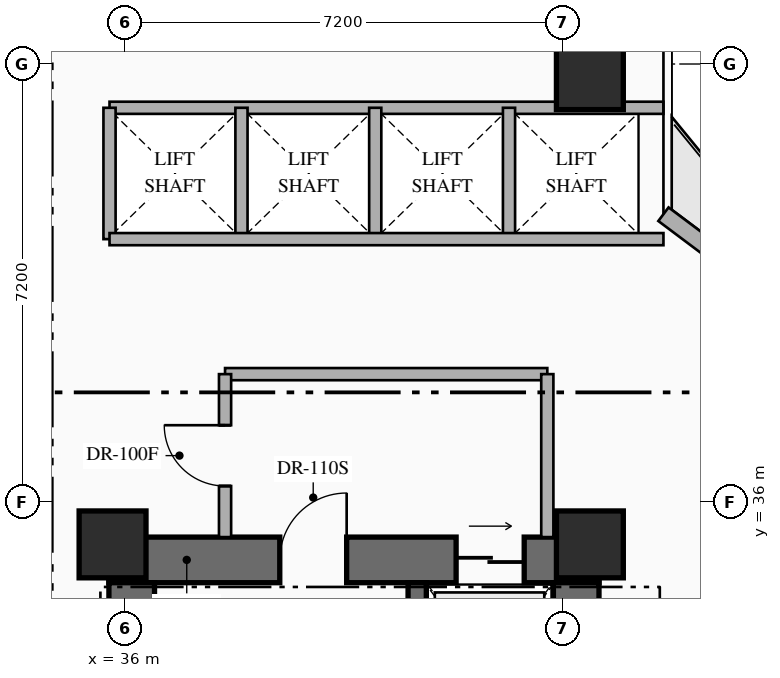
"""IFC4 building model, lengths in metres.
Left out: names, types, materials, properties, quantities, classifications, styles, units other than length and angle.
Written with IfcOpenShell. Run it as: python <this file> out.ifc"""

import sys

from ifc_helpers import new_model, si_unit, direction, frame, frame_2d, origin, origin_2d, place, context, subcontext, project, spatial, rectangle, extrude, element, fill, save


model = new_model("IFC4")
c1 = context("Model", 3, precision=1e-05, world=origin(), true_north=direction((0.0, 1.0)))
c2 = subcontext(c1, "Body", "Model", "MODEL_VIEW")
j1 = project(units=[si_unit("LENGTHUNIT", "METRE"), si_unit("PLANEANGLEUNIT", "RADIAN")], contexts=[c1])
p1 = place(None, origin())
s1 = spatial("IfcSite", under=j1, at=p1, CompositionType="ELEMENT")
p2 = place(p1, origin())
s2 = spatial("IfcBuilding", under=s1, at=p2, CompositionType="ELEMENT")
p3 = place(p2, frame((0.0, 0.0, 74.6)))
s3 = spatial("IfcBuildingStorey", under=s2, at=p3, CompositionType="ELEMENT", Elevation=74.6)
p4 = place(p3, frame((35.74, 35.045, 0.0), z_axis=(0.0, 0.0, 1.0), x_axis=(1.0, 0.0, 0.0)))
e1 = element("IfcWall", 1, at=p4, inside=s3, PredefinedType="SHEAR", context=c2, shape_type="SweptSolid", body=[
    extrude(rectangle(XDim=8.06, YDim=0.75, at=frame_2d((4.03, 0.0))), origin(), (0.0, 0.0, 1.0), 3.35),
])
p5 = place(p4, frame((2.81, 0.0, 0.0)))
e2 = element("IfcOpeningElement", 2, at=p5, cuts=e1, PredefinedType="OPENING", context=c2, shape_type="SweptSolid", body=[
    extrude(rectangle(XDim=1.1, YDim=2.2, at=frame_2d((0.55, 1.1))), frame((0.0, 0.385, 0.0), z_axis=(0.0, -1.0, 0.0), x_axis=(1.0, 0.0, 0.0)), (0.0, 0.0, 1.0), 0.77),
])
p6 = place(p4, frame((5.71, 0.0, 0.0)))
e3 = element("IfcOpeningElement", 3, at=p6, cuts=e1, PredefinedType="OPENING", context=c2, shape_type="SweptSolid", body=[
    extrude(rectangle(XDim=1.12, YDim=2.15, at=frame_2d((0.56, 1.075))), frame((0.0, 0.385, 0.0), z_axis=(0.0, -1.0, 0.0), x_axis=(1.0, 0.0, 0.0)), (0.0, 0.0, 1.0), 0.77),
])
p7 = place(p3, frame((36.115, 25.19, 0.0), z_axis=(0.0, 0.0, 1.0), x_axis=(0.0, 1.0, 0.0)))
e4 = element("IfcWall", 4, at=p7, inside=s3, PredefinedType="SHEAR", context=c2, shape_type="SweptSolid", body=[
    extrude(rectangle(XDim=9.48, YDim=0.75, at=frame_2d((4.74, 0.0))), origin(), (0.0, 0.0, 1.0), 3.35),
])
p8 = place(p3, frame((43.425, 25.19, 0.0), z_axis=(0.0, 0.0, 1.0), x_axis=(0.0, 1.0, 0.0)))
e5 = element("IfcWall", 5, at=p8, inside=s3, PredefinedType="SHEAR", context=c2, shape_type="SweptSolid", body=[
    extrude(rectangle(XDim=9.48, YDim=0.75, at=frame_2d((4.74, 0.0))), origin(), (0.0, 0.0, 1.0), 3.35),
])
p9 = place(p8, frame((1.51, 0.0, 0.0)))
e6 = element("IfcOpeningElement", 6, at=p9, cuts=e5, PredefinedType="OPENING", context=c2, shape_type="SweptSolid", body=[
    extrude(rectangle(XDim=0.85, YDim=2.08, at=frame_2d((0.425, 1.04))), frame((0.0, 0.385, 0.0), z_axis=(0.0, -1.0, 0.0), x_axis=(1.0, 0.0, 0.0)), (0.0, 0.0, 1.0), 0.77),
])
p10 = place(p8, frame((4.76, 0.0, 0.0)))
e7 = element("IfcOpeningElement", 7, at=p10, cuts=e5, PredefinedType="OPENING", context=c2, shape_type="SweptSolid", body=[
    extrude(rectangle(XDim=0.85, YDim=2.08, at=frame_2d((0.425, 1.04))), frame((0.0, 0.385, 0.0), z_axis=(0.0, -1.0, 0.0), x_axis=(1.0, 0.0, 0.0)), (0.0, 0.0, 1.0), 0.77),
])
p11 = place(p3, frame((40.81, 25.19, 0.0), z_axis=(0.0, 0.0, 1.0), x_axis=(0.0, 1.0, 0.0)))
e8 = element("IfcWall", 8, at=p11, inside=s3, PredefinedType="SHEAR", context=c2, shape_type="SweptSolid", body=[
    extrude(rectangle(XDim=9.48, YDim=0.3, at=frame_2d((4.74, 0.0))), origin(), (0.0, 0.0, 1.0), 3.35),
])
for number, where, z_axis, x_axis in (
    (9, (35.8, 35.3, 0.0), (0.0, 0.0, 1.0), (1.0, 0.0, 0.0)),
    (10, (43.65, 35.3, 0.0), (0.0, 0.0, 1.0), (1.0, 0.0, 0.0)),
    (11, (43.65, 43.0, 0.0), (0.0, 0.0, 1.0), (1.0, 0.0, 0.0)),
):
    element("IfcColumn", number, at=place(p3, frame(where, z_axis=z_axis, x_axis=x_axis)), inside=s3, PredefinedType="COLUMN", context=c2, shape_type="SweptSolid", body=[
        extrude(rectangle(XDim=1.1, YDim=1.1, at=origin_2d()), origin(), (0.0, 0.0, 1.0), 3.35),
    ])
p12 = place(p3, frame((44.86, 40.73, 0.0), z_axis=(0.0, 0.0, 1.0), x_axis=(0.800006902154, -0.599990797017, 0.0)))
e12 = element("IfcWall", 12, at=p12, inside=s3, PredefinedType="STANDARD", context=c2, shape_type="SweptSolid", body=[
    extrude(rectangle(XDim=29.712, YDim=0.28, at=frame_2d((14.856, 0.0))), origin(), (0.0, 0.0, 1.0), 3.13),
])
p13 = place(p12, frame((14.249, 0.0, 0.0)))
e13 = element("IfcOpeningElement", 13, at=p13, cuts=e12, PredefinedType="OPENING", context=c2, shape_type="SweptSolid", body=[
    extrude(rectangle(XDim=1.1, YDim=2.2, at=frame_2d((0.55, 1.1))), frame((0.0, 0.15, 0.0), z_axis=(0.0, -1.0, 0.0), x_axis=(1.0, 0.0, 0.0)), (0.0, 0.0, 1.0), 0.3),
])
p14 = place(p12, frame((1.612, 0.0, 0.85)))
e14 = element("IfcOpeningElement", 14, at=p14, cuts=e12, PredefinedType="OPENING", context=c2, shape_type="SweptSolid", body=[
    extrude(rectangle(XDim=1.4, YDim=1.8, at=frame_2d((0.7, 0.9))), frame((0.0, 0.15, 0.0), z_axis=(0.0, -1.0, 0.0), x_axis=(1.0, 0.0, 0.0)), (0.0, 0.0, 1.0), 0.3),
])
p15 = place(p12, frame((5.667, 0.0, 0.85)))
e15 = element("IfcOpeningElement", 15, at=p15, cuts=e12, PredefinedType="OPENING", context=c2, shape_type="SweptSolid", body=[
    extrude(rectangle(XDim=1.4, YDim=1.8, at=frame_2d((0.7, 0.9))), frame((0.0, 0.15, 0.0), z_axis=(0.0, -1.0, 0.0), x_axis=(1.0, 0.0, 0.0)), (0.0, 0.0, 1.0), 0.3),
])
p16 = place(p12, frame((9.912, 0.0, 0.85)))
e16 = element("IfcOpeningElement", 16, at=p16, cuts=e12, PredefinedType="OPENING", context=c2, shape_type="SweptSolid", body=[
    extrude(rectangle(XDim=1.4, YDim=1.8, at=frame_2d((0.7, 0.9))), frame((0.0, 0.15, 0.0), z_axis=(0.0, -1.0, 0.0), x_axis=(1.0, 0.0, 0.0)), (0.0, 0.0, 1.0), 0.3),
])
p17 = place(p12, frame((19.528, 0.0, 0.85)))
e17 = element("IfcOpeningElement", 17, at=p17, cuts=e12, PredefinedType="OPENING", context=c2, shape_type="SweptSolid", body=[
    extrude(rectangle(XDim=1.4, YDim=1.8, at=frame_2d((0.7, 0.9))), frame((0.0, 0.15, 0.0), z_axis=(0.0, -1.0, 0.0), x_axis=(1.0, 0.0, 0.0)), (0.0, 0.0, 1.0), 0.3),
])
p18 = place(p12, frame((23.451, 0.0, 0.85)))
e18 = element("IfcOpeningElement", 18, at=p18, cuts=e12, PredefinedType="OPENING", context=c2, shape_type="SweptSolid", body=[
    extrude(rectangle(XDim=1.4, YDim=1.8, at=frame_2d((0.7, 0.9))), frame((0.0, 0.15, 0.0), z_axis=(0.0, -1.0, 0.0), x_axis=(1.0, 0.0, 0.0)), (0.0, 0.0, 1.0), 0.3),
])
p19 = place(p12, frame((27.852, 0.0, 0.85)))
e19 = element("IfcOpeningElement", 19, at=p19, cuts=e12, PredefinedType="OPENING", context=c2, shape_type="SweptSolid", body=[
    extrude(rectangle(XDim=1.4, YDim=1.8, at=frame_2d((0.7, 0.9))), frame((0.0, 0.15, 0.0), z_axis=(0.0, -1.0, 0.0), x_axis=(1.0, 0.0, 0.0)), (0.0, 0.0, 1.0), 0.3),
])
p20 = place(p3, frame((37.65, 38.1, 0.0), z_axis=(0.0, 0.0, 1.0), x_axis=(1.0, 0.0, 0.0)))
e20 = element("IfcWall", 20, at=p20, inside=s3, PredefinedType="STANDARD", context=c2, shape_type="SweptSolid", body=[
    extrude(rectangle(XDim=5.3, YDim=0.2, at=frame_2d((2.65, 0.0))), origin(), (0.0, 0.0, 1.0), 3.13),
])
p21 = place(p3, frame((42.95, 35.42, 0.0), z_axis=(0.0, 0.0, 1.0), x_axis=(0.0, 1.0, 0.0)))
e21 = element("IfcWall", 21, at=p21, inside=s3, PredefinedType="STANDARD", context=c2, shape_type="SweptSolid", body=[
    extrude(rectangle(XDim=2.68, YDim=0.2, at=frame_2d((1.34, 0.0))), origin(), (0.0, 0.0, 1.0), 3.13),
])
p22 = place(p3, frame((37.65, 35.42, 0.0), z_axis=(0.0, 0.0, 1.0), x_axis=(0.0, 1.0, 0.0)))
e22 = element("IfcWall", 22, at=p22, inside=s3, PredefinedType="STANDARD", context=c2, shape_type="SweptSolid", body=[
    extrude(rectangle(XDim=2.68, YDim=0.2, at=frame_2d((1.34, 0.0))), origin(), (0.0, 0.0, 1.0), 3.13),
])
p23 = place(p22, frame((0.84, 0.0, 0.0)))
e23 = element("IfcOpeningElement", 23, at=p23, cuts=e22, PredefinedType="OPENING", context=c2, shape_type="SweptSolid", body=[
    extrude(rectangle(XDim=1.0, YDim=2.2, at=frame_2d((0.5, 1.1))), frame((0.0, 0.11, 0.0), z_axis=(0.0, -1.0, 0.0), x_axis=(1.0, 0.0, 0.0)), (0.0, 0.0, 1.0), 0.22),
])
p24 = place(p3, frame((35.75, 42.48, 0.0), z_axis=(0.0, 0.0, 1.0), x_axis=(1.0, 0.0, 0.0)))
e24 = element("IfcWall", 24, at=p24, inside=s3, PredefinedType="STANDARD", context=c2, shape_type="SweptSolid", body=[
    extrude(rectangle(XDim=9.11, YDim=0.2, at=frame_2d((4.555, 0.0))), origin(), (0.0, 0.0, 1.0), 3.13),
])
for number, where, z_axis, x_axis in (
    (25, (35.75, 40.32, 0.0), (0.0, 0.0, 1.0), (0.0, 1.0, 0.0)),
    (26, (37.92, 40.32, 0.0), (0.0, 0.0, 1.0), (0.0, 1.0, 0.0)),
    (27, (40.12, 40.32, 0.0), (0.0, 0.0, 1.0), (0.0, 1.0, 0.0)),
    (28, (42.32, 40.32, 0.0), (0.0, 0.0, 1.0), (0.0, 1.0, 0.0)),
):
    element("IfcWall", number, at=place(p3, frame(where, z_axis=z_axis, x_axis=x_axis)), inside=s3, PredefinedType="STANDARD", context=c2, shape_type="SweptSolid", body=[
        extrude(rectangle(XDim=2.16, YDim=0.2, at=frame_2d((1.08, 0.0))), origin(), (0.0, 0.0, 1.0), 3.13),
    ])
p25 = place(p3, frame((35.75, 40.32, 0.0), z_axis=(0.0, 0.0, 1.0), x_axis=(1.0, 0.0, 0.0)))
e29 = element("IfcWall", 29, at=p25, inside=s3, PredefinedType="STANDARD", context=c2, shape_type="SweptSolid", body=[
    extrude(rectangle(XDim=9.11, YDim=0.2, at=frame_2d((4.555, 0.0))), origin(), (0.0, 0.0, 1.0), 3.13),
])
p26 = place(p5, origin())
e30 = element("IfcDoor", 30, at=p26, inside=s3, OperationType="SINGLE_SWING_RIGHT", PredefinedType="DOOR", context=c2, shape_type="SweptSolid", body=[
    extrude(rectangle(XDim=1.1, YDim=2.2, at=frame_2d((0.55, 1.1))), frame((0.0, 0.025, 0.0), z_axis=(0.0, -1.0, 0.0), x_axis=(1.0, 0.0, 0.0)), (0.0, 0.0, 1.0), 0.05),
])
fill(e2, e30)
p27 = place(p6, origin())
e31 = element("IfcDoor", 31, at=p27, inside=s3, OperationType="SLIDING_TO_RIGHT", PredefinedType="USERDEFINED", context=c2, shape_type="SweptSolid", body=[
    extrude(rectangle(XDim=1.12, YDim=2.15, at=frame_2d((0.56, 1.075))), frame((0.0, 0.025, 0.0), z_axis=(0.0, -1.0, 0.0), x_axis=(1.0, 0.0, 0.0)), (0.0, 0.0, 1.0), 0.05),
])
fill(e3, e31)
p28 = place(p23, origin())
e32 = element("IfcDoor", 32, at=p28, inside=s3, OperationType="SINGLE_SWING_RIGHT", PredefinedType="DOOR", context=c2, shape_type="SweptSolid", body=[
    extrude(rectangle(XDim=1.0, YDim=2.2, at=frame_2d((0.5, 1.1))), frame((0.0, 0.025, 0.0), z_axis=(0.0, -1.0, 0.0), x_axis=(1.0, 0.0, 0.0)), (0.0, 0.0, 1.0), 0.05),
])
fill(e23, e32)
save(model, sys.argv[1])
